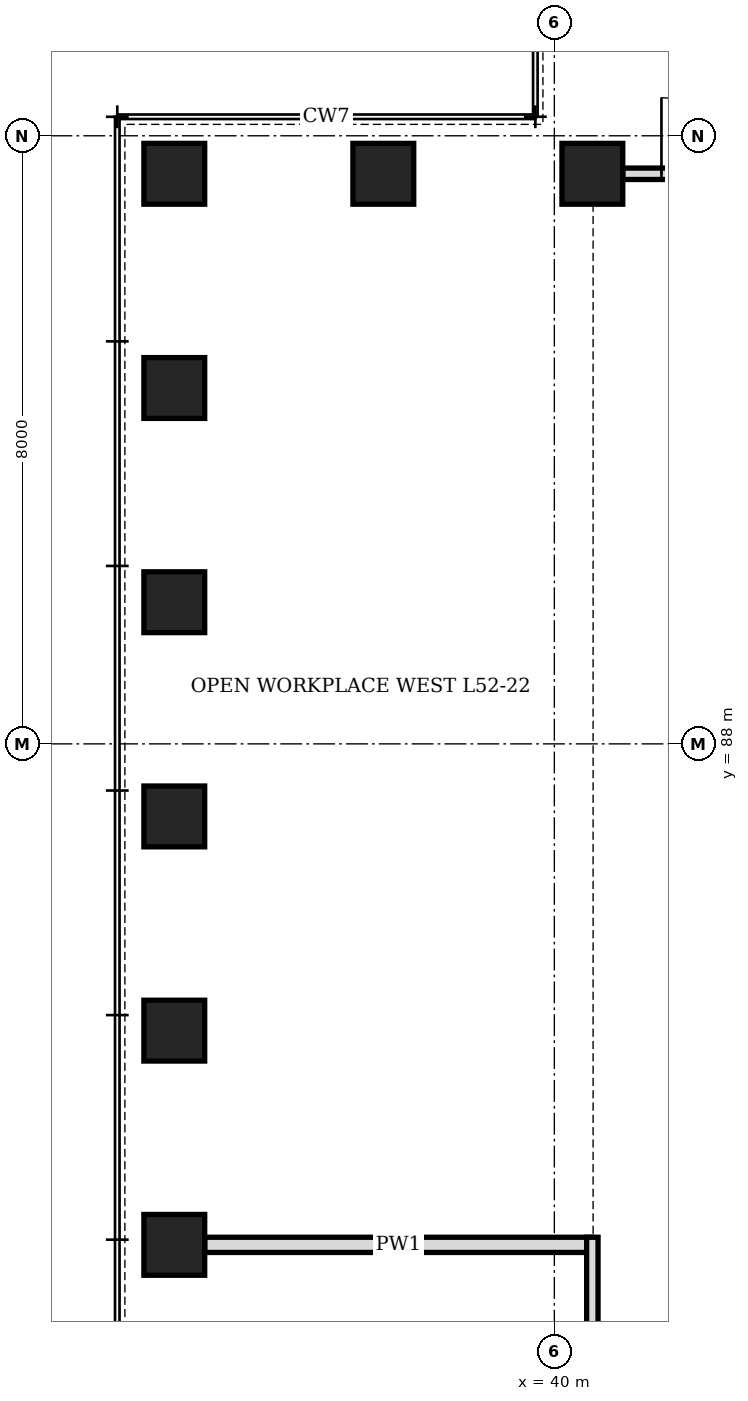
"""IFC4 building model, lengths in metres.
Left out: names, types, materials, properties, quantities, classifications, styles, units other than length and angle.
Written with IfcOpenShell. Run it as: python <this file> out.ifc"""

import sys

from ifc_helpers import new_model, si_unit, direction, frame, frame_2d, origin, origin_2d, place, context, subcontext, project, spatial, rectangle, hollow_rectangle, extrude, element, fill, save


model = new_model("IFC4")
c1 = context("Model", 3, precision=1e-05, world=origin(), true_north=direction((0.0, 1.0)))
c2 = subcontext(c1, "Body", "Model", "MODEL_VIEW")
j1 = project(units=[si_unit("LENGTHUNIT", "METRE"), si_unit("PLANEANGLEUNIT", "RADIAN")], contexts=[c1])
p1 = place(None, origin())
s1 = spatial("IfcSite", under=j1, at=p1, CompositionType="ELEMENT")
p2 = place(p1, origin())
s2 = spatial("IfcBuilding", under=s1, at=p2, CompositionType="ELEMENT")
p3 = place(p2, frame((0.0, 0.0, 231.7)))
s3 = spatial("IfcBuildingStorey", under=s2, at=p3, CompositionType="ELEMENT", Elevation=231.7)
for number, where, z_axis, x_axis in (
    (1, (40.5, 95.5, 0.0), (0.0, 0.0, 1.0), (1.0, 0.0, 0.0)),
    (2, (37.75, 95.5, 0.0), (0.0, 0.0, 1.0), (1.0, 0.0, 0.0)),
    (3, (35.0, 95.5, 0.0), (0.0, 0.0, 1.0), (0.0, 1.0, 0.0)),
    (4, (35.0, 92.682, 0.0), (0.0, 0.0, 1.0), (0.0, 1.0, 0.0)),
    (5, (35.0, 89.864, 0.0), (0.0, 0.0, 1.0), (0.0, 1.0, 0.0)),
    (6, (35.0, 87.045, 0.0), (0.0, 0.0, 1.0), (0.0, 1.0, 0.0)),
    (7, (35.0, 84.227, 0.0), (0.0, 0.0, 1.0), (0.0, 1.0, 0.0)),
    (8, (35.0, 81.409, 0.0), (0.0, 0.0, 1.0), (0.0, 1.0, 0.0)),
):
    element("IfcColumn", number, at=place(p3, frame(where, z_axis=z_axis, x_axis=x_axis)), inside=s3, PredefinedType="COLUMN", context=c2, shape_type="SweptSolid", body=[
        extrude(hollow_rectangle(XDim=0.8, YDim=0.8, WallThickness=0.08, at=origin_2d()), origin(), (0.0, 0.0, 1.0), 4.2),
    ])
p4 = place(p3, frame((35.4, 81.409, 0.0), z_axis=(0.0, 0.0, 1.0), x_axis=(1.0, 0.0, 0.0)))
e9 = element("IfcWall", 9, at=p4, inside=s3, PredefinedType="PARTITIONING", context=c2, shape_type="SweptSolid", body=[
    extrude(rectangle(XDim=5.1, YDim=0.2, at=frame_2d((2.55, 0.0))), origin(), (0.0, 0.0, 1.0), 3.428),
])
p5 = place(p3, frame((40.9, 95.5, 0.0), z_axis=(0.0, 0.0, 1.0), x_axis=(1.0, 0.0, 0.0)))
e10 = element("IfcWall", 10, at=p5, inside=s3, PredefinedType="PARTITIONING", context=c2, shape_type="SweptSolid", body=[
    extrude(rectangle(XDim=10.973, YDim=0.15, at=frame_2d((5.486, 0.0))), origin(), (0.0, 0.0, 1.0), 4.04),
])
p6 = place(p5, frame((0.509, 0.0, 0.0)))
e11 = element("IfcOpeningElement", 11, at=p6, cuts=e10, PredefinedType="OPENING", context=c2, shape_type="SweptSolid", body=[
    extrude(rectangle(XDim=1.0, YDim=2.4, at=frame_2d((0.5, 1.2))), frame((0.0, 0.085, 0.0), z_axis=(0.0, -1.0, 0.0), x_axis=(1.0, 0.0, 0.0)), (0.0, 0.0, 1.0), 0.17),
])
p7 = place(p5, frame((3.327, 0.0, 0.0)))
e12 = element("IfcOpeningElement", 12, at=p7, cuts=e10, PredefinedType="OPENING", context=c2, shape_type="SweptSolid", body=[
    extrude(rectangle(XDim=1.0, YDim=2.4, at=frame_2d((0.5, 1.2))), frame((0.0, 0.085, 0.0), z_axis=(0.0, -1.0, 0.0), x_axis=(1.0, 0.0, 0.0)), (0.0, 0.0, 1.0), 0.17),
])
p8 = place(p5, frame((6.146, 0.0, 0.0)))
e13 = element("IfcOpeningElement", 13, at=p8, cuts=e10, PredefinedType="OPENING", context=c2, shape_type="SweptSolid", body=[
    extrude(rectangle(XDim=1.0, YDim=2.4, at=frame_2d((0.5, 1.2))), frame((0.0, 0.085, 0.0), z_axis=(0.0, -1.0, 0.0), x_axis=(1.0, 0.0, 0.0)), (0.0, 0.0, 1.0), 0.17),
])
p9 = place(p5, frame((8.964, 0.0, 0.0)))
e14 = element("IfcOpeningElement", 14, at=p9, cuts=e10, PredefinedType="OPENING", context=c2, shape_type="SweptSolid", body=[
    extrude(rectangle(XDim=1.0, YDim=2.4, at=frame_2d((0.5, 1.2))), frame((0.0, 0.085, 0.0), z_axis=(0.0, -1.0, 0.0), x_axis=(1.0, 0.0, 0.0)), (0.0, 0.0, 1.0), 0.17),
])
p10 = place(p3, frame((40.5, 70.036, 0.0), z_axis=(0.0, 0.0, 1.0), x_axis=(0.0, 1.0, 0.0)))
e15 = element("IfcWall", 15, at=p10, inside=s3, PredefinedType="PARTITIONING", context=c2, shape_type="SweptSolid", body=[
    extrude(rectangle(XDim=11.473, YDim=0.15, at=frame_2d((5.736, 0.0))), origin(), (0.0, 0.0, 1.0), 4.04),
])
p11 = place(p10, frame((1.009, 0.0, 0.0)))
e16 = element("IfcOpeningElement", 16, at=p11, cuts=e15, PredefinedType="OPENING", context=c2, shape_type="SweptSolid", body=[
    extrude(rectangle(XDim=1.0, YDim=2.1, at=frame_2d((0.5, 1.05))), frame((0.0, 0.085, 0.0), z_axis=(0.0, -1.0, 0.0), x_axis=(1.0, 0.0, 0.0)), (0.0, 0.0, 1.0), 0.17),
])
p12 = place(p10, frame((6.646, 0.0, 0.0)))
e17 = element("IfcOpeningElement", 17, at=p12, cuts=e15, PredefinedType="OPENING", context=c2, shape_type="SweptSolid", body=[
    extrude(rectangle(XDim=1.0, YDim=2.1, at=frame_2d((0.5, 1.05))), frame((0.0, 0.085, 0.0), z_axis=(0.0, -1.0, 0.0), x_axis=(1.0, 0.0, 0.0)), (0.0, 0.0, 1.0), 0.17),
])
p13 = place(p6, origin())
e18 = element("IfcDoor", 18, at=p13, inside=s3, OperationType="SINGLE_SWING_RIGHT", PredefinedType="DOOR", context=c2, shape_type="SweptSolid", body=[
    extrude(rectangle(XDim=1.0, YDim=2.4, at=frame_2d((0.5, 1.2))), frame((0.0, 0.075, 0.0), z_axis=(0.0, -1.0, 0.0), x_axis=(1.0, 0.0, 0.0)), (0.0, 0.0, 1.0), 0.149),
])
fill(e11, e18)
save(model, sys.argv[1])
